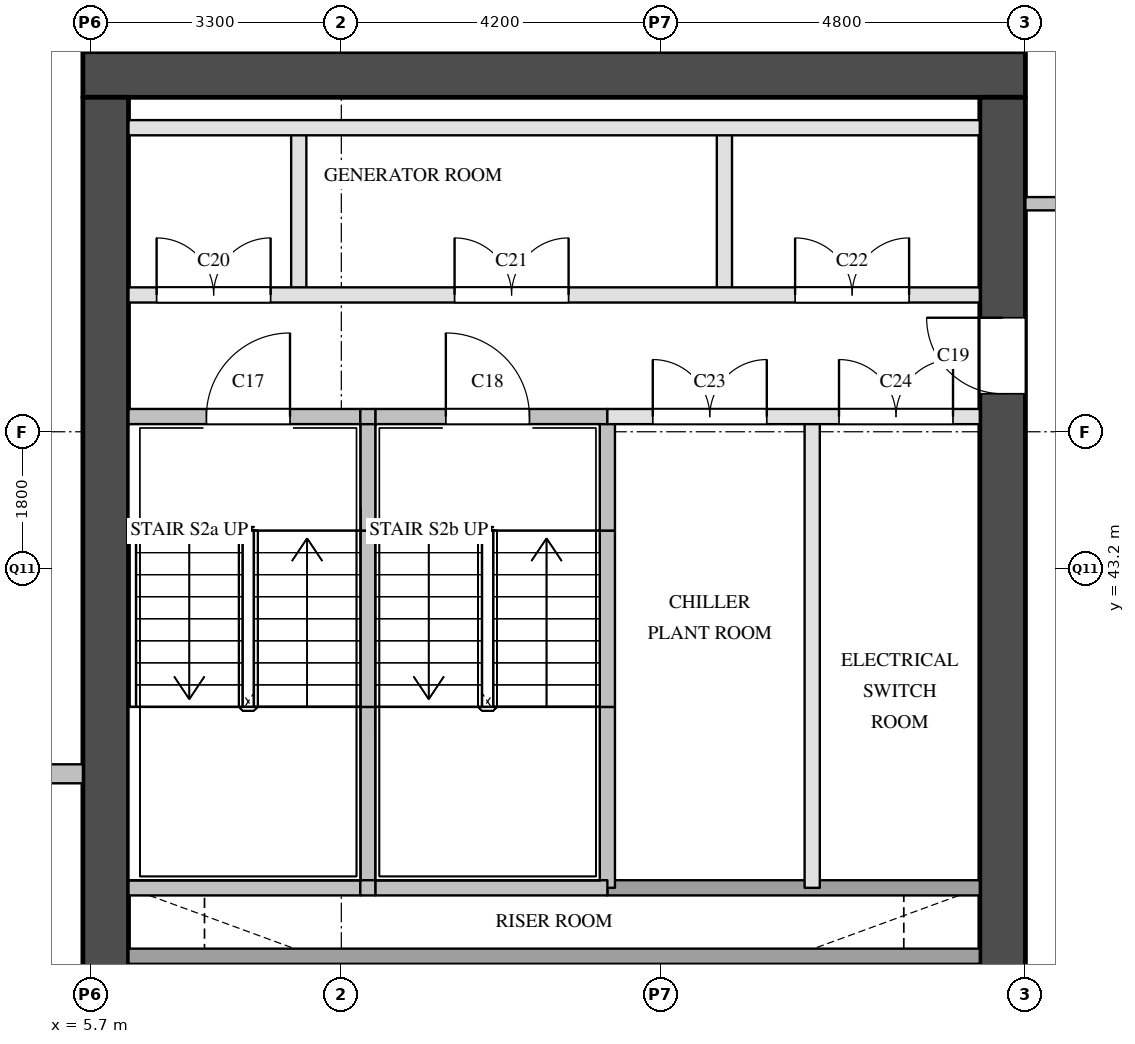
"""IFC4 building model, lengths in metres.
Left out: names, types, materials, properties, quantities, classifications, styles, units other than length and angle.
Written with IfcOpenShell. Run it as: python <this file> out.ifc"""

import sys

from ifc_helpers import new_model, si_unit, direction, frame, frame_2d, origin, place, context, subcontext, project, spatial, rectangle, extrude, element, fill, save


model = new_model("IFC4")
c1 = context("Model", 3, precision=1e-05, world=origin(), true_north=direction((0.0, 1.0)))
c2 = subcontext(c1, "Body", "Model", "MODEL_VIEW")
j1 = project(units=[si_unit("LENGTHUNIT", "METRE"), si_unit("PLANEANGLEUNIT", "RADIAN")], contexts=[c1])
p1 = place(None, origin())
s1 = spatial("IfcSite", under=j1, at=p1, CompositionType="ELEMENT")
p2 = place(p1, origin())
s2 = spatial("IfcBuilding", under=s1, at=p2, CompositionType="ELEMENT")
p3 = place(p2, frame((0.0, 0.0, 123.4)))
s3 = spatial("IfcBuildingStorey", under=s2, at=p3, CompositionType="ELEMENT", Elevation=123.4)
p4 = place(p3, frame((5.6, 49.7, 0.0), z_axis=(0.0, 0.0, 1.0), x_axis=(1.0, 0.0, 0.0)))
e1 = element("IfcWall", 1, at=p4, inside=s3, PredefinedType="SHEAR", context=c2, shape_type="SweptSolid", body=[
    extrude(rectangle(XDim=12.4, YDim=0.6, at=frame_2d((6.2, 0.0))), origin(), (0.0, 0.0, 1.0), 5.7),
])
p5 = place(p3, frame((5.9, 29.1, 0.0), z_axis=(0.0, 0.0, 1.0), x_axis=(0.0, 1.0, 0.0)))
e2 = element("IfcWall", 2, at=p5, inside=s3, PredefinedType="SHEAR", context=c2, shape_type="SweptSolid", body=[
    extrude(rectangle(XDim=20.3, YDim=0.6, at=frame_2d((10.15, 0.0))), origin(), (0.0, 0.0, 1.0), 5.7),
])
p6 = place(p5, frame((3.6, 0.0, 0.0)))
e3 = element("IfcOpeningElement", 3, at=p6, cuts=e2, PredefinedType="OPENING", context=c2, shape_type="SweptSolid", body=[
    extrude(rectangle(XDim=1.8, YDim=2.1, at=frame_2d((0.9, 1.05))), frame((0.0, 0.31, 0.0), z_axis=(0.0, -1.0, 0.0), x_axis=(1.0, 0.0, 0.0)), (0.0, 0.0, 1.0), 0.62),
])
p7 = place(p3, frame((17.7, 29.1, 0.0), z_axis=(0.0, 0.0, 1.0), x_axis=(0.0, 1.0, 0.0)))
e4 = element("IfcWall", 4, at=p7, inside=s3, PredefinedType="SHEAR", context=c2, shape_type="SweptSolid", body=[
    extrude(rectangle(XDim=20.3, YDim=0.6, at=frame_2d((10.15, 0.0))), origin(), (0.0, 0.0, 1.0), 5.7),
])
p8 = place(p7, frame((1.25, 0.0, 0.0)))
e5 = element("IfcOpeningElement", 5, at=p8, cuts=e4, PredefinedType="OPENING", context=c2, shape_type="SweptSolid", body=[
    extrude(rectangle(XDim=0.7, YDim=2.1, at=frame_2d((0.35, 1.05))), frame((0.0, 0.31, 0.0), z_axis=(0.0, -1.0, 0.0), x_axis=(1.0, 0.0, 0.0)), (0.0, 0.0, 1.0), 0.62),
])
p9 = place(p7, frame((7.05, 0.0, 0.0)))
e6 = element("IfcOpeningElement", 6, at=p9, cuts=e4, PredefinedType="OPENING", context=c2, shape_type="SweptSolid", body=[
    extrude(rectangle(XDim=0.7, YDim=2.1, at=frame_2d((0.35, 1.05))), frame((0.0, 0.31, 0.0), z_axis=(0.0, -1.0, 0.0), x_axis=(1.0, 0.0, 0.0)), (0.0, 0.0, 1.0), 0.62),
])
p10 = place(p7, frame((16.4, 0.0, 0.0)))
e7 = element("IfcOpeningElement", 7, at=p10, cuts=e4, PredefinedType="OPENING", context=c2, shape_type="SweptSolid", body=[
    extrude(rectangle(XDim=1.0, YDim=2.1, at=frame_2d((0.5, 1.05))), frame((0.0, 0.31, 0.0), z_axis=(0.0, -1.0, 0.0), x_axis=(1.0, 0.0, 0.0)), (0.0, 0.0, 1.0), 0.62),
])
p11 = place(p3, frame((8.3, 34.9, 0.0), z_axis=(0.0, 0.0, 1.0), x_axis=(0.0, 1.0, 0.0)))
e8 = element("IfcWall", 8, at=p11, inside=s3, PredefinedType="SOLIDWALL", context=c2, shape_type="SweptSolid", body=[
    extrude(rectangle(XDim=3.2, YDim=0.2, at=frame_2d((1.6, 0.0))), origin(), (0.0, 0.0, 1.0), 5.7),
])
p12 = place(p3, frame((8.44, 46.8, 0.0), z_axis=(0.0, 0.0, 1.0), x_axis=(0.0, 1.0, 0.0)))
e9 = element("IfcWall", 9, at=p12, inside=s3, PredefinedType="PARTITIONING", context=c2, shape_type="SweptSolid", body=[
    extrude(rectangle(XDim=2.2, YDim=0.2, at=frame_2d((1.1, 0.0))), origin(), (0.0, 0.0, 1.0), 5.7),
])
p13 = place(p3, frame((9.35, 39.0, 0.0), z_axis=(0.0, 0.0, 1.0), x_axis=(0.0, 1.0, 0.0)))
e10 = element("IfcWall", 10, at=p13, inside=s3, PredefinedType="SOLIDWALL", context=c2, shape_type="SweptSolid", body=[
    extrude(rectangle(XDim=2.38, YDim=0.2, at=frame_2d((1.19, 0.0))), origin(), (0.0, 0.0, 1.0), 5.7),
])
p14 = place(p3, frame((9.35, 41.38, 0.0), z_axis=(0.0, 0.0, 1.0), x_axis=(0.0, 1.0, 0.0)))
e11 = element("IfcWall", 11, at=p14, inside=s3, PredefinedType="SOLIDWALL", context=c2, shape_type="SweptSolid", body=[
    extrude(rectangle(XDim=2.32, YDim=0.2, at=frame_2d((1.16, 0.0))), origin(), (0.0, 0.0, 1.0), 5.7),
])
p15 = place(p3, frame((9.35, 43.7, 0.0), z_axis=(0.0, 0.0, 1.0), x_axis=(0.0, 1.0, 0.0)))
e12 = element("IfcWall", 12, at=p15, inside=s3, PredefinedType="SOLIDWALL", context=c2, shape_type="SweptSolid", body=[
    extrude(rectangle(XDim=1.5, YDim=0.2, at=frame_2d((0.75, 0.0))), origin(), (0.0, 0.0, 1.0), 5.7),
])
for number, where, z_axis, x_axis in (
    (13, (10.4, 34.9, 0.0), (0.0, 0.0, 1.0), (0.0, 1.0, 0.0)),
    (14, (12.5, 34.9, 0.0), (0.0, 0.0, 1.0), (0.0, 1.0, 0.0)),
):
    element("IfcWall", number, at=place(p3, frame(where, z_axis=z_axis, x_axis=x_axis)), inside=s3, PredefinedType="SOLIDWALL", context=c2, shape_type="SweptSolid", body=[
        extrude(rectangle(XDim=3.2, YDim=0.2, at=frame_2d((1.6, 0.0))), origin(), (0.0, 0.0, 1.0), 5.7),
    ])
p16 = place(p3, frame((12.5, 39.0, 0.0), z_axis=(0.0, 0.0, 1.0), x_axis=(0.0, 1.0, 0.0)))
e15 = element("IfcWall", 15, at=p16, inside=s3, PredefinedType="SOLIDWALL", context=c2, shape_type="SweptSolid", body=[
    extrude(rectangle(XDim=2.38, YDim=0.2, at=frame_2d((1.19, 0.0))), origin(), (0.0, 0.0, 1.0), 5.7),
])
p17 = place(p3, frame((12.5, 41.38, 0.0), z_axis=(0.0, 0.0, 1.0), x_axis=(0.0, 1.0, 0.0)))
e16 = element("IfcWall", 16, at=p17, inside=s3, PredefinedType="SOLIDWALL", context=c2, shape_type="SweptSolid", body=[
    extrude(rectangle(XDim=2.32, YDim=0.2, at=frame_2d((1.16, 0.0))), origin(), (0.0, 0.0, 1.0), 5.7),
])
p18 = place(p3, frame((12.5, 43.7, 0.0), z_axis=(0.0, 0.0, 1.0), x_axis=(0.0, 1.0, 0.0)))
e17 = element("IfcWall", 17, at=p18, inside=s3, PredefinedType="SOLIDWALL", context=c2, shape_type="SweptSolid", body=[
    extrude(rectangle(XDim=1.5, YDim=0.2, at=frame_2d((0.75, 0.0))), origin(), (0.0, 0.0, 1.0), 5.7),
])
p19 = place(p3, frame((14.04, 46.8, 0.0), z_axis=(0.0, 0.0, 1.0), x_axis=(0.0, 1.0, 0.0)))
e18 = element("IfcWall", 18, at=p19, inside=s3, PredefinedType="PARTITIONING", context=c2, shape_type="SweptSolid", body=[
    extrude(rectangle(XDim=2.2, YDim=0.2, at=frame_2d((1.1, 0.0))), origin(), (0.0, 0.0, 1.0), 5.7),
])
p20 = place(p3, frame((14.6, 34.9, 0.0), z_axis=(0.0, 0.0, 1.0), x_axis=(0.0, 1.0, 0.0)))
e19 = element("IfcWall", 19, at=p20, inside=s3, PredefinedType="SOLIDWALL", context=c2, shape_type="SweptSolid", body=[
    extrude(rectangle(XDim=3.2, YDim=0.2, at=frame_2d((1.6, 0.0))), origin(), (0.0, 0.0, 1.0), 5.7),
])
p21 = place(p3, frame((15.195, 39.0, 0.0), z_axis=(0.0, 0.0, 1.0), x_axis=(0.0, 1.0, 0.0)))
e20 = element("IfcWall", 20, at=p21, inside=s3, PredefinedType="PARTITIONING", context=c2, shape_type="SweptSolid", body=[
    extrude(rectangle(XDim=6.2, YDim=0.2, at=frame_2d((3.1, 0.0))), origin(), (0.0, 0.0, 1.0), 5.7),
])
p22 = place(p3, frame((16.7, 34.9, 0.0), z_axis=(0.0, 0.0, 1.0), x_axis=(0.0, 1.0, 0.0)))
e21 = element("IfcWall", 21, at=p22, inside=s3, PredefinedType="SOLIDWALL", context=c2, shape_type="SweptSolid", body=[
    extrude(rectangle(XDim=3.2, YDim=0.2, at=frame_2d((1.6, 0.0))), origin(), (0.0, 0.0, 1.0), 5.7),
])
p23 = place(p3, frame((6.2, 38.1, 0.0), z_axis=(0.0, 0.0, 1.0), x_axis=(1.0, 0.0, 0.0)))
e22 = element("IfcWall", 22, at=p23, inside=s3, PredefinedType="SOLIDWALL", context=c2, shape_type="SweptSolid", body=[
    extrude(rectangle(XDim=11.2, YDim=0.2, at=frame_2d((5.6, 0.0))), origin(), (0.0, 0.0, 1.0), 5.7),
])
p24 = place(p3, frame((12.5, 39.0, 0.0), z_axis=(0.0, 0.0, 1.0), x_axis=(1.0, 0.0, 0.0)))
e23 = element("IfcWall", 23, at=p24, inside=s3, PredefinedType="SOLIDWALL", context=c2, shape_type="SweptSolid", body=[
    extrude(rectangle(XDim=4.9, YDim=0.2, at=frame_2d((2.45, 0.0))), origin(), (0.0, 0.0, 1.0), 5.7),
])
p25 = place(p3, frame((6.2, 39.0, 0.0), z_axis=(0.0, 0.0, 1.0), x_axis=(1.0, 0.0, 0.0)))
e24 = element("IfcWall", 24, at=p25, inside=s3, PredefinedType="SOLIDWALL", context=c2, shape_type="SweptSolid", body=[
    extrude(rectangle(XDim=3.05, YDim=0.2, at=frame_2d((1.525, 0.0))), origin(), (0.0, 0.0, 1.0), 5.7),
])
p26 = place(p3, frame((9.25, 39.0, 0.0), z_axis=(0.0, 0.0, 1.0), x_axis=(1.0, 0.0, 0.0)))
e25 = element("IfcWall", 25, at=p26, inside=s3, PredefinedType="SOLIDWALL", context=c2, shape_type="SweptSolid", body=[
    extrude(rectangle(XDim=0.2, YDim=0.2, at=frame_2d((0.1, 0.0))), origin(), (0.0, 0.0, 1.0), 5.7),
])
p27 = place(p3, frame((9.45, 39.0, 0.0), z_axis=(0.0, 0.0, 1.0), x_axis=(1.0, 0.0, 0.0)))
e26 = element("IfcWall", 26, at=p27, inside=s3, PredefinedType="SOLIDWALL", context=c2, shape_type="SweptSolid", body=[
    extrude(rectangle(XDim=3.05, YDim=0.2, at=frame_2d((1.525, 0.0))), origin(), (0.0, 0.0, 1.0), 5.7),
])
p28 = place(p3, frame((12.5, 45.2, 0.0), z_axis=(0.0, 0.0, 1.0), x_axis=(1.0, 0.0, 0.0)))
e27 = element("IfcWall", 27, at=p28, inside=s3, PredefinedType="PARTITIONING", context=c2, shape_type="SweptSolid", body=[
    extrude(rectangle(XDim=4.9, YDim=0.2, at=frame_2d((2.45, 0.0))), origin(), (0.0, 0.0, 1.0), 5.7),
])
p29 = place(p28, frame((0.597, 0.0, 0.0)))
e28 = element("IfcOpeningElement", 28, at=p29, cuts=e27, PredefinedType="OPENING", context=c2, shape_type="SweptSolid", body=[
    extrude(rectangle(XDim=1.5, YDim=2.1, at=frame_2d((0.75, 1.05))), frame((0.0, 0.11, 0.0), z_axis=(0.0, -1.0, 0.0), x_axis=(1.0, 0.0, 0.0)), (0.0, 0.0, 1.0), 0.22),
])
p30 = place(p28, frame((3.048, 0.0, 0.0)))
e29 = element("IfcOpeningElement", 29, at=p30, cuts=e27, PredefinedType="OPENING", context=c2, shape_type="SweptSolid", body=[
    extrude(rectangle(XDim=1.5, YDim=2.1, at=frame_2d((0.75, 1.05))), frame((0.0, 0.11, 0.0), z_axis=(0.0, -1.0, 0.0), x_axis=(1.0, 0.0, 0.0)), (0.0, 0.0, 1.0), 0.22),
])
p31 = place(p3, frame((6.2, 45.2, 0.0), z_axis=(0.0, 0.0, 1.0), x_axis=(1.0, 0.0, 0.0)))
e30 = element("IfcWall", 30, at=p31, inside=s3, PredefinedType="SOLIDWALL", context=c2, shape_type="SweptSolid", body=[
    extrude(rectangle(XDim=3.05, YDim=0.2, at=frame_2d((1.525, 0.0))), origin(), (0.0, 0.0, 1.0), 5.7),
])
p32 = place(p31, frame((1.025, 0.0, 0.0)))
e31 = element("IfcOpeningElement", 31, at=p32, cuts=e30, PredefinedType="OPENING", context=c2, shape_type="SweptSolid", body=[
    extrude(rectangle(XDim=1.1, YDim=2.1, at=frame_2d((0.55, 1.05))), frame((0.0, 0.11, 0.0), z_axis=(0.0, -1.0, 0.0), x_axis=(1.0, 0.0, 0.0)), (0.0, 0.0, 1.0), 0.22),
])
p33 = place(p3, frame((9.25, 45.2, 0.0), z_axis=(0.0, 0.0, 1.0), x_axis=(1.0, 0.0, 0.0)))
e32 = element("IfcWall", 32, at=p33, inside=s3, PredefinedType="SOLIDWALL", context=c2, shape_type="SweptSolid", body=[
    extrude(rectangle(XDim=0.2, YDim=0.2, at=frame_2d((0.1, 0.0))), origin(), (0.0, 0.0, 1.0), 5.7),
])
p34 = place(p3, frame((9.45, 45.2, 0.0), z_axis=(0.0, 0.0, 1.0), x_axis=(1.0, 0.0, 0.0)))
e33 = element("IfcWall", 33, at=p34, inside=s3, PredefinedType="SOLIDWALL", context=c2, shape_type="SweptSolid", body=[
    extrude(rectangle(XDim=3.05, YDim=0.2, at=frame_2d((1.525, 0.0))), origin(), (0.0, 0.0, 1.0), 5.7),
])
p35 = place(p34, frame((0.925, 0.0, 0.0)))
e34 = element("IfcOpeningElement", 34, at=p35, cuts=e33, PredefinedType="OPENING", context=c2, shape_type="SweptSolid", body=[
    extrude(rectangle(XDim=1.1, YDim=2.1, at=frame_2d((0.55, 1.05))), frame((0.0, 0.11, 0.0), z_axis=(0.0, -1.0, 0.0), x_axis=(1.0, 0.0, 0.0)), (0.0, 0.0, 1.0), 0.22),
])
p36 = place(p3, frame((6.2, 46.8, 0.0), z_axis=(0.0, 0.0, 1.0), x_axis=(1.0, 0.0, 0.0)))
e35 = element("IfcWall", 35, at=p36, inside=s3, PredefinedType="PARTITIONING", context=c2, shape_type="SweptSolid", body=[
    extrude(rectangle(XDim=11.2, YDim=0.2, at=frame_2d((5.6, 0.0))), origin(), (0.0, 0.0, 1.0), 5.7),
])
p37 = place(p36, frame((0.37, 0.0, 0.0)))
e36 = element("IfcOpeningElement", 36, at=p37, cuts=e35, PredefinedType="OPENING", context=c2, shape_type="SweptSolid", body=[
    extrude(rectangle(XDim=1.5, YDim=2.1, at=frame_2d((0.75, 1.05))), frame((0.0, 0.11, 0.0), z_axis=(0.0, -1.0, 0.0), x_axis=(1.0, 0.0, 0.0)), (0.0, 0.0, 1.0), 0.22),
])
p38 = place(p36, frame((4.29, 0.0, 0.0)))
e37 = element("IfcOpeningElement", 37, at=p38, cuts=e35, PredefinedType="OPENING", context=c2, shape_type="SweptSolid", body=[
    extrude(rectangle(XDim=1.5, YDim=2.1, at=frame_2d((0.75, 1.05))), frame((0.0, 0.11, 0.0), z_axis=(0.0, -1.0, 0.0), x_axis=(1.0, 0.0, 0.0)), (0.0, 0.0, 1.0), 0.22),
])
p39 = place(p36, frame((8.77, 0.0, 0.0)))
e38 = element("IfcOpeningElement", 38, at=p39, cuts=e35, PredefinedType="OPENING", context=c2, shape_type="SweptSolid", body=[
    extrude(rectangle(XDim=1.5, YDim=2.1, at=frame_2d((0.75, 1.05))), frame((0.0, 0.11, 0.0), z_axis=(0.0, -1.0, 0.0), x_axis=(1.0, 0.0, 0.0)), (0.0, 0.0, 1.0), 0.22),
])
p40 = place(p3, frame((6.2, 49.0, 0.0), z_axis=(0.0, 0.0, 1.0), x_axis=(1.0, 0.0, 0.0)))
e39 = element("IfcWall", 39, at=p40, inside=s3, PredefinedType="PARTITIONING", context=c2, shape_type="SweptSolid", body=[
    extrude(rectangle(XDim=11.2, YDim=0.2, at=frame_2d((5.6, 0.0))), origin(), (0.0, 0.0, 1.0), 5.7),
])
p41 = place(p3, frame((18.0, 48.0, 0.0), z_axis=(0.0, 0.0, 1.0), x_axis=(1.0, 0.0, 0.0)))
e40 = element("IfcWall", 40, at=p41, inside=s3, PredefinedType="PARTITIONING", context=c2, shape_type="SweptSolid", body=[
    extrude(rectangle(XDim=18.0, YDim=0.175, at=frame_2d((9.0, 0.0))), origin(), (0.0, 0.0, 1.0), 5.7),
])
p42 = place(p41, frame((4.0, 0.0, 0.0)))
e41 = element("IfcOpeningElement", 41, at=p42, cuts=e40, PredefinedType="OPENING", context=c2, shape_type="SweptSolid", body=[
    extrude(rectangle(XDim=1.0, YDim=2.1, at=frame_2d((0.5, 1.05))), frame((0.0, 0.097, 0.0), z_axis=(0.0, -1.0, 0.0), x_axis=(1.0, 0.0, 0.0)), (0.0, 0.0, 1.0), 0.195),
])
p43 = place(p41, frame((13.0, 0.0, 0.0)))
e42 = element("IfcOpeningElement", 42, at=p43, cuts=e40, PredefinedType="OPENING", context=c2, shape_type="SweptSolid", body=[
    extrude(rectangle(XDim=1.0, YDim=2.1, at=frame_2d((0.5, 1.05))), frame((0.0, 0.097, 0.0), z_axis=(0.0, -1.0, 0.0), x_axis=(1.0, 0.0, 0.0)), (0.0, 0.0, 1.0), 0.195),
])
p44 = place(p3, frame((0.0, 40.5, 0.0), z_axis=(0.0, 0.0, 1.0), x_axis=(1.0, 0.0, 0.0)))
e43 = element("IfcWall", 43, at=p44, inside=s3, PredefinedType="PARTITIONING", context=c2, shape_type="SweptSolid", body=[
    extrude(rectangle(XDim=5.6, YDim=0.25, at=frame_2d((2.8, 0.0))), origin(), (0.0, 0.0, 1.0), 5.7),
])
p45 = place(p32, origin())
e44 = element("IfcDoor", 44, at=p45, inside=s3, OperationType="SINGLE_SWING_RIGHT", PredefinedType="DOOR", context=c2, shape_type="SweptSolid", body=[
    extrude(rectangle(XDim=1.1, YDim=2.1, at=frame_2d((0.55, 1.05))), frame((0.0, 0.025, 0.0), z_axis=(0.0, -1.0, 0.0), x_axis=(1.0, 0.0, 0.0)), (0.0, 0.0, 1.0), 0.05),
])
fill(e31, e44)
p46 = place(p35, origin())
e45 = element("IfcDoor", 45, at=p46, inside=s3, OperationType="SINGLE_SWING_LEFT", PredefinedType="DOOR", context=c2, shape_type="SweptSolid", body=[
    extrude(rectangle(XDim=1.1, YDim=2.1, at=frame_2d((0.55, 1.05))), frame((0.0, 0.025, 0.0), z_axis=(0.0, -1.0, 0.0), x_axis=(1.0, 0.0, 0.0)), (0.0, 0.0, 1.0), 0.05),
])
fill(e34, e45)
p47 = place(p10, origin())
e46 = element("IfcDoor", 46, at=p47, inside=s3, OperationType="SINGLE_SWING_RIGHT", PredefinedType="DOOR", context=c2, shape_type="SweptSolid", body=[
    extrude(rectangle(XDim=1.0, YDim=2.1, at=frame_2d((0.5, 1.05))), frame((0.0, 0.025, 0.0), z_axis=(0.0, -1.0, 0.0), x_axis=(1.0, 0.0, 0.0)), (0.0, 0.0, 1.0), 0.05),
])
fill(e7, e46)
p48 = place(p37, origin())
e47 = element("IfcDoor", 47, at=p48, inside=s3, OperationType="DOUBLE_DOOR_SINGLE_SWING", PredefinedType="DOOR", context=c2, shape_type="SweptSolid", body=[
    extrude(rectangle(XDim=1.5, YDim=2.1, at=frame_2d((0.75, 1.05))), frame((0.0, 0.025, 0.0), z_axis=(0.0, -1.0, 0.0), x_axis=(1.0, 0.0, 0.0)), (0.0, 0.0, 1.0), 0.05),
])
fill(e36, e47)
p49 = place(p38, origin())
e48 = element("IfcDoor", 48, at=p49, inside=s3, OperationType="DOUBLE_DOOR_SINGLE_SWING", PredefinedType="DOOR", context=c2, shape_type="SweptSolid", body=[
    extrude(rectangle(XDim=1.5, YDim=2.1, at=frame_2d((0.75, 1.05))), frame((0.0, 0.025, 0.0), z_axis=(0.0, -1.0, 0.0), x_axis=(1.0, 0.0, 0.0)), (0.0, 0.0, 1.0), 0.05),
])
fill(e37, e48)
p50 = place(p39, origin())
e49 = element("IfcDoor", 49, at=p50, inside=s3, OperationType="DOUBLE_DOOR_SINGLE_SWING", PredefinedType="DOOR", context=c2, shape_type="SweptSolid", body=[
    extrude(rectangle(XDim=1.5, YDim=2.1, at=frame_2d((0.75, 1.05))), frame((0.0, 0.025, 0.0), z_axis=(0.0, -1.0, 0.0), x_axis=(1.0, 0.0, 0.0)), (0.0, 0.0, 1.0), 0.05),
])
fill(e38, e49)
p51 = place(p29, origin())
e50 = element("IfcDoor", 50, at=p51, inside=s3, OperationType="DOUBLE_DOOR_SINGLE_SWING", PredefinedType="DOOR", context=c2, shape_type="SweptSolid", body=[
    extrude(rectangle(XDim=1.5, YDim=2.1, at=frame_2d((0.75, 1.05))), frame((0.0, 0.025, 0.0), z_axis=(0.0, -1.0, 0.0), x_axis=(1.0, 0.0, 0.0)), (0.0, 0.0, 1.0), 0.05),
])
fill(e28, e50)
p52 = place(p30, origin())
e51 = element("IfcDoor", 51, at=p52, inside=s3, OperationType="DOUBLE_DOOR_SINGLE_SWING", PredefinedType="DOOR", context=c2, shape_type="SweptSolid", body=[
    extrude(rectangle(XDim=1.5, YDim=2.1, at=frame_2d((0.75, 1.05))), frame((0.0, 0.025, 0.0), z_axis=(0.0, -1.0, 0.0), x_axis=(1.0, 0.0, 0.0)), (0.0, 0.0, 1.0), 0.05),
])
fill(e29, e51)
save(model, sys.argv[1])
